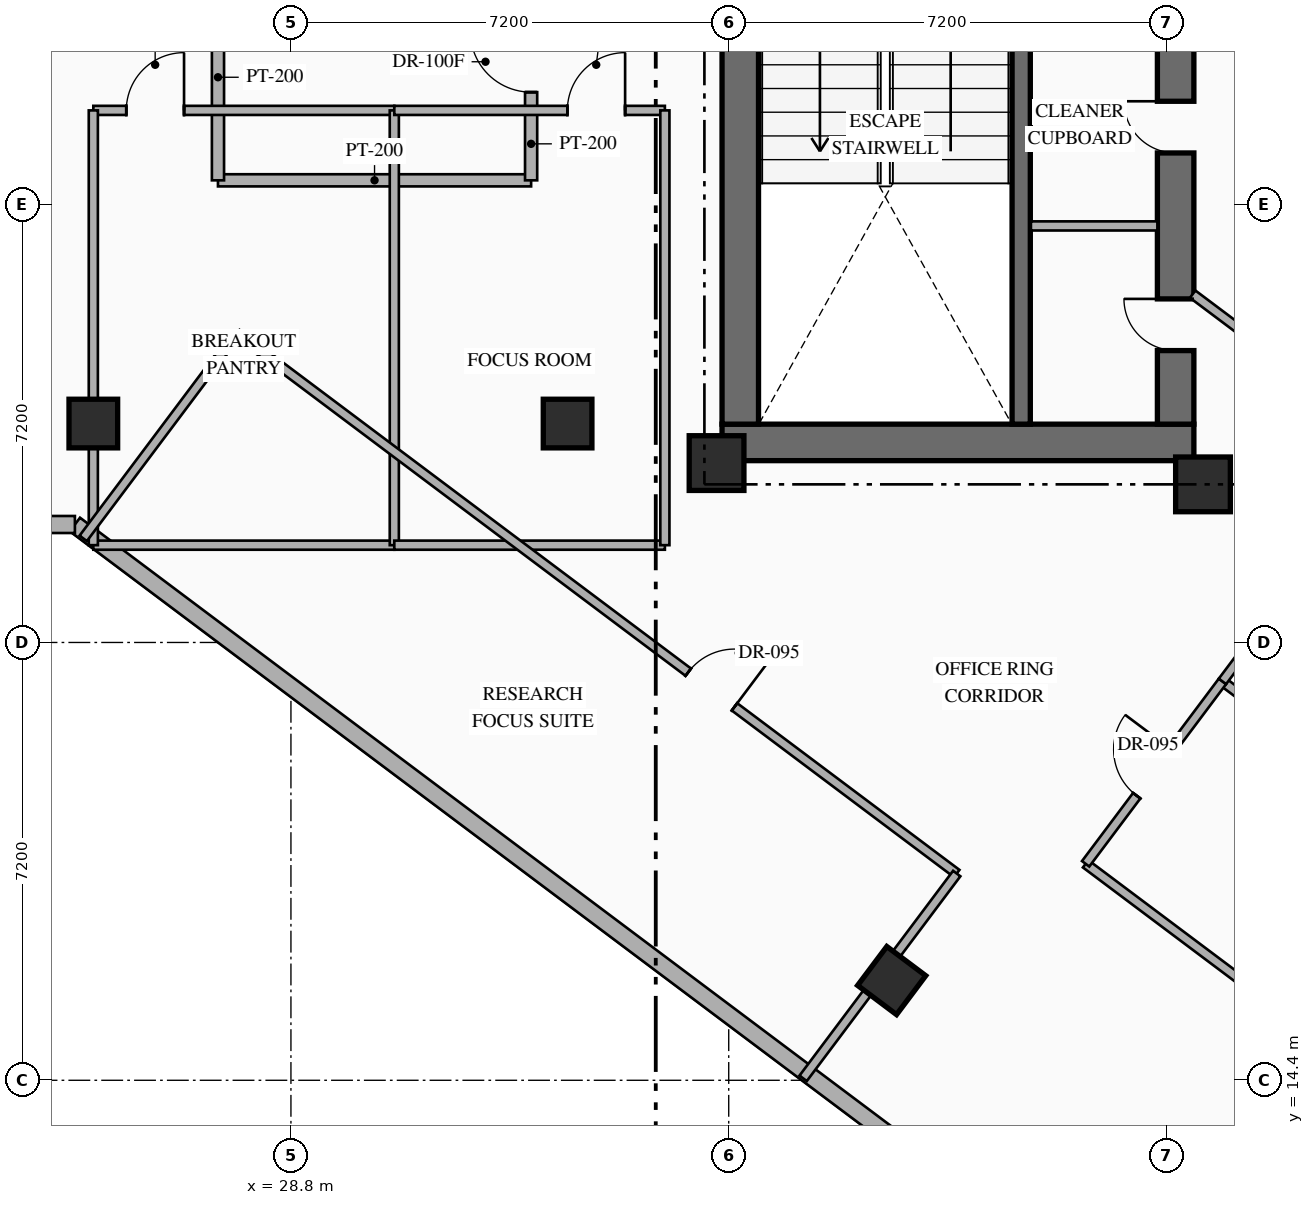
"""IFC4 building model, lengths in metres.
Left out: names, types, materials, properties, quantities, classifications, styles, units other than length and angle.
Written with IfcOpenShell. Run it as: python <this file> out.ifc"""

import sys

from ifc_helpers import new_model, si_unit, direction, frame, frame_2d, origin, origin_2d, place, context, subcontext, project, spatial, rectangle, hollow_rectangle, extrude, element, fill, save


model = new_model("IFC4")
c1 = context("Model", 3, precision=1e-05, world=origin(), true_north=direction((0.0, 1.0)))
c2 = subcontext(c1, "Body", "Model", "MODEL_VIEW")
j1 = project(units=[si_unit("LENGTHUNIT", "METRE"), si_unit("PLANEANGLEUNIT", "RADIAN")], contexts=[c1])
p1 = place(None, origin())
s1 = spatial("IfcSite", under=j1, at=p1, CompositionType="ELEMENT")
p2 = place(p1, origin())
s2 = spatial("IfcBuilding", under=s1, at=p2, CompositionType="ELEMENT")
p3 = place(p2, frame((0.0, 0.0, 167.25)))
s3 = spatial("IfcBuildingStorey", under=s2, at=p3, CompositionType="ELEMENT", Elevation=167.25)
p4 = place(p3, frame((35.89, 24.89, 0.0), z_axis=(0.0, 0.0, 1.0), x_axis=(1.0, 0.0, 0.0)))
e1 = element("IfcWall", 1, at=p4, inside=s3, PredefinedType="SHEAR", context=c2, shape_type="SweptSolid", body=[
    extrude(rectangle(XDim=7.76, YDim=0.6, at=frame_2d((3.88, 0.0))), origin(), (0.0, 0.0, 1.0), 3.6),
])
p5 = place(p3, frame((36.19, 25.19, 0.0), z_axis=(0.0, 0.0, 1.0), x_axis=(0.0, 1.0, 0.0)))
e2 = element("IfcWall", 2, at=p5, inside=s3, PredefinedType="SHEAR", context=c2, shape_type="SweptSolid", body=[
    extrude(rectangle(XDim=9.48, YDim=0.6, at=frame_2d((4.74, 0.0))), origin(), (0.0, 0.0, 1.0), 3.6),
])
p6 = place(p3, frame((43.35, 25.19, 0.0), z_axis=(0.0, 0.0, 1.0), x_axis=(0.0, 1.0, 0.0)))
e3 = element("IfcWall", 3, at=p6, inside=s3, PredefinedType="SHEAR", context=c2, shape_type="SweptSolid", body=[
    extrude(rectangle(XDim=9.48, YDim=0.6, at=frame_2d((4.74, 0.0))), origin(), (0.0, 0.0, 1.0), 3.6),
])
p7 = place(p6, frame((1.21, 0.0, 0.0)))
e4 = element("IfcOpeningElement", 4, at=p7, cuts=e3, PredefinedType="OPENING", context=c2, shape_type="SweptSolid", body=[
    extrude(rectangle(XDim=0.85, YDim=2.08, at=frame_2d((0.425, 1.04))), frame((0.0, 0.31, 0.0), z_axis=(0.0, -1.0, 0.0), x_axis=(1.0, 0.0, 0.0)), (0.0, 0.0, 1.0), 0.62),
])
p8 = place(p6, frame((4.46, 0.0, 0.0)))
e5 = element("IfcOpeningElement", 5, at=p8, cuts=e3, PredefinedType="OPENING", context=c2, shape_type="SweptSolid", body=[
    extrude(rectangle(XDim=0.85, YDim=2.08, at=frame_2d((0.425, 1.04))), frame((0.0, 0.31, 0.0), z_axis=(0.0, -1.0, 0.0), x_axis=(1.0, 0.0, 0.0)), (0.0, 0.0, 1.0), 0.62),
])
p9 = place(p3, frame((40.81, 25.19, 0.0), z_axis=(0.0, 0.0, 1.0), x_axis=(0.0, 1.0, 0.0)))
e6 = element("IfcWall", 6, at=p9, inside=s3, PredefinedType="SHEAR", context=c2, shape_type="SweptSolid", body=[
    extrude(rectangle(XDim=9.48, YDim=0.3, at=frame_2d((4.74, 0.0))), origin(), (0.0, 0.0, 1.0), 3.6),
])
for number, where, z_axis, x_axis in (
    (7, (35.8, 24.55, 0.0), (0.0, 0.0, 1.0), (1.0, 0.0, 0.0)),
    (8, (43.8, 24.2, 0.0), (0.0, 0.0, 1.0), (1.0, 0.0, 0.0)),
):
    element("IfcColumn", number, at=place(p3, frame(where, z_axis=z_axis, x_axis=x_axis)), inside=s3, PredefinedType="COLUMN", context=c2, shape_type="SweptSolid", body=[
        extrude(rectangle(XDim=0.9, YDim=0.9, at=origin_2d()), origin(), (0.0, 0.0, 1.0), 3.6),
    ])
for number, where, z_axis, x_axis in (
    (9, (25.55, 25.2, 0.0), (0.0, 0.0, 1.0), (1.0, 0.0, 0.0)),
    (10, (33.35, 25.2, 0.0), (0.0, 0.0, 1.0), (1.0, 0.0, 0.0)),
    (11, (38.68, 16.04, 0.0), (0.0, 0.0, 1.0), (0.8, -0.6, 0.0)),
):
    element("IfcColumn", number, at=place(p3, frame(where, z_axis=z_axis, x_axis=x_axis)), inside=s3, PredefinedType="COLUMN", context=c2, shape_type="SweptSolid", body=[
        extrude(hollow_rectangle(XDim=0.8, YDim=0.8, WallThickness=0.032, at=origin_2d()), origin(), (0.0, 0.0, 1.0), 3.6),
    ])
p10 = place(p3, frame((44.918, 8.787, 0.0), z_axis=(0.0, 0.0, 1.0), x_axis=(-0.800004765927, 0.599993645378, 0.0)))
e12 = element("IfcWall", 12, at=p10, inside=s3, PredefinedType="STANDARD", context=c2, shape_type="SweptSolid", body=[
    extrude(rectangle(XDim=24.588, YDim=0.28, at=frame_2d((12.294, 0.0))), origin(), (0.0, 0.0, 1.0), 3.35),
])
p11 = place(p3, frame((25.247, 23.54, 0.0), z_axis=(0.0, 0.0, 1.0), x_axis=(-1.0, 0.0, 0.0)))
e13 = element("IfcWall", 13, at=p11, inside=s3, PredefinedType="STANDARD", context=c2, shape_type="SweptSolid", body=[
    extrude(rectangle(XDim=6.747, YDim=0.28, at=frame_2d((3.374, 0.0))), origin(), (0.0, 0.0, 1.0), 3.35),
])
p12 = place(p3, frame((40.97, 28.45, 0.0), z_axis=(0.0, 0.0, 1.0), x_axis=(1.0, 0.0, 0.0)))
e14 = element("IfcWall", 14, at=p12, inside=s3, PredefinedType="PARTITIONING", context=c2, shape_type="SweptSolid", body=[
    extrude(rectangle(XDim=2.08, YDim=0.15, at=frame_2d((1.04, 0.0))), origin(), (0.0, 0.0, 1.0), 3.35),
])
p13 = place(p3, frame((27.6, 29.2, 0.0), z_axis=(0.0, 0.0, 1.0), x_axis=(1.0, 0.0, 0.0)))
e15 = element("IfcWall", 15, at=p13, inside=s3, PredefinedType="STANDARD", context=c2, shape_type="SweptSolid", body=[
    extrude(rectangle(XDim=5.15, YDim=0.2, at=frame_2d((2.575, 0.0))), origin(), (0.0, 0.0, 1.0), 3.35),
])
p14 = place(p3, frame((27.6, 29.2, 0.0), z_axis=(0.0, 0.0, 1.0), x_axis=(0.0, 1.0, 0.0)))
e16 = element("IfcWall", 16, at=p14, inside=s3, PredefinedType="STANDARD", context=c2, shape_type="SweptSolid", body=[
    extrude(rectangle(XDim=3.39, YDim=0.2, at=frame_2d((1.695, 0.0))), origin(), (0.0, 0.0, 1.0), 3.35),
])
p15 = place(p3, frame((32.75, 29.2, 0.0), z_axis=(0.0, 0.0, 1.0), x_axis=(0.0, 1.0, 0.0)))
e17 = element("IfcWall", 17, at=p15, inside=s3, PredefinedType="STANDARD", context=c2, shape_type="SweptSolid", body=[
    extrude(rectangle(XDim=3.39, YDim=0.2, at=frame_2d((1.695, 0.0))), origin(), (0.0, 0.0, 1.0), 3.35),
])
p16 = place(p15, frame((1.45, 0.0, 0.0)))
e18 = element("IfcOpeningElement", 18, at=p16, cuts=e17, PredefinedType="OPENING", context=c2, shape_type="SweptSolid", body=[
    extrude(rectangle(XDim=1.0, YDim=2.2, at=frame_2d((0.5, 1.1))), frame((0.0, 0.11, 0.0), z_axis=(0.0, -1.0, 0.0), x_axis=(1.0, 0.0, 0.0)), (0.0, 0.0, 1.0), 0.22),
])
p17 = place(p3, frame((25.55, 23.2, 0.0), z_axis=(0.0, 0.0, 1.0), x_axis=(1.0, 0.0, 0.0)))
e19 = element("IfcWall", 19, at=p17, inside=s3, PredefinedType="PARTITIONING", context=c2, shape_type="SweptSolid", body=[
    extrude(rectangle(XDim=4.95, YDim=0.15, at=frame_2d((2.475, 0.0))), origin(), (0.0, 0.0, 1.0), 3.35),
])
p18 = place(p3, frame((25.55, 30.35, 0.0), z_axis=(0.0, 0.0, 1.0), x_axis=(1.0, 0.0, 0.0)))
e20 = element("IfcWall", 20, at=p18, inside=s3, PredefinedType="PARTITIONING", context=c2, shape_type="SweptSolid", body=[
    extrude(rectangle(XDim=4.95, YDim=0.15, at=frame_2d((2.475, 0.0))), origin(), (0.0, 0.0, 1.0), 3.35),
])
p19 = place(p18, frame((0.542, 0.0, 0.0)))
e21 = element("IfcOpeningElement", 21, at=p19, cuts=e20, PredefinedType="OPENING", context=c2, shape_type="SweptSolid", body=[
    extrude(rectangle(XDim=0.95, YDim=2.15, at=frame_2d((0.475, 1.075))), frame((0.0, 0.085, 0.0), z_axis=(0.0, -1.0, 0.0), x_axis=(1.0, 0.0, 0.0)), (0.0, 0.0, 1.0), 0.17),
])
p20 = place(p3, frame((25.55, 23.2, 0.0), z_axis=(0.0, 0.0, 1.0), x_axis=(0.0, 1.0, 0.0)))
e22 = element("IfcWall", 22, at=p20, inside=s3, PredefinedType="PARTITIONING", context=c2, shape_type="SweptSolid", body=[
    extrude(rectangle(XDim=7.15, YDim=0.15, at=frame_2d((3.575, 0.0))), origin(), (0.0, 0.0, 1.0), 2.695),
])
p21 = place(p3, frame((30.5, 23.2, 0.0), z_axis=(0.0, 0.0, 1.0), x_axis=(0.0, 1.0, 0.0)))
e23 = element("IfcWall", 23, at=p21, inside=s3, PredefinedType="PARTITIONING", context=c2, shape_type="SweptSolid", body=[
    extrude(rectangle(XDim=7.15, YDim=0.15, at=frame_2d((3.575, 0.0))), origin(), (0.0, 0.0, 1.0), 3.35),
])
p22 = place(p3, frame((30.5, 23.2, 0.0), z_axis=(0.0, 0.0, 1.0), x_axis=(1.0, 0.0, 0.0)))
e24 = element("IfcWall", 24, at=p22, inside=s3, PredefinedType="PARTITIONING", context=c2, shape_type="SweptSolid", body=[
    extrude(rectangle(XDim=4.45, YDim=0.15, at=frame_2d((2.225, 0.0))), origin(), (0.0, 0.0, 1.0), 3.35),
])
p23 = place(p3, frame((30.5, 30.35, 0.0), z_axis=(0.0, 0.0, 1.0), x_axis=(1.0, 0.0, 0.0)))
e25 = element("IfcWall", 25, at=p23, inside=s3, PredefinedType="PARTITIONING", context=c2, shape_type="SweptSolid", body=[
    extrude(rectangle(XDim=4.45, YDim=0.15, at=frame_2d((2.225, 0.0))), origin(), (0.0, 0.0, 1.0), 3.35),
])
p24 = place(p23, frame((2.846, 0.0, 0.0)))
e26 = element("IfcOpeningElement", 26, at=p24, cuts=e25, PredefinedType="OPENING", context=c2, shape_type="SweptSolid", body=[
    extrude(rectangle(XDim=0.95, YDim=2.15, at=frame_2d((0.475, 1.075))), frame((0.0, 0.085, 0.0), z_axis=(0.0, -1.0, 0.0), x_axis=(1.0, 0.0, 0.0)), (0.0, 0.0, 1.0), 0.17),
])
p25 = place(p3, frame((34.95, 23.2, 0.0), z_axis=(0.0, 0.0, 1.0), x_axis=(0.0, 1.0, 0.0)))
e27 = element("IfcWall", 27, at=p25, inside=s3, PredefinedType="PARTITIONING", context=c2, shape_type="SweptSolid", body=[
    extrude(rectangle(XDim=7.15, YDim=0.15, at=frame_2d((3.575, 0.0))), origin(), (0.0, 0.0, 1.0), 3.35),
])
for number, where, z_axis, x_axis in (
    (28, (41.87, 17.96, 0.0), (0.0, 0.0, 1.0), (0.8, -0.6, 0.0)),
    (29, (44.12, 20.96, 0.0), (0.0, 0.0, 1.0), (0.8, -0.6, 0.0)),
):
    element("IfcWall", number, at=place(p3, frame(where, z_axis=z_axis, x_axis=x_axis)), inside=s3, PredefinedType="PARTITIONING", context=c2, shape_type="SweptSolid", body=[
        extrude(rectangle(XDim=10.36, YDim=0.15, at=frame_2d((5.18, 0.0))), origin(), (0.0, 0.0, 1.0), 3.35),
    ])
p26 = place(p3, frame((41.87, 17.96, 0.0), z_axis=(0.0, 0.0, 1.0), x_axis=(0.6, 0.8, 0.0)))
e30 = element("IfcWall", 30, at=p26, inside=s3, PredefinedType="PARTITIONING", context=c2, shape_type="SweptSolid", body=[
    extrude(rectangle(XDim=3.75, YDim=0.15, at=frame_2d((1.875, 0.0))), origin(), (0.0, 0.0, 1.0), 3.35),
])
p27 = place(p26, frame((1.4, 0.0, 0.0)))
e31 = element("IfcOpeningElement", 31, at=p27, cuts=e30, PredefinedType="OPENING", context=c2, shape_type="SweptSolid", body=[
    extrude(rectangle(XDim=0.95, YDim=2.15, at=frame_2d((0.475, 1.075))), frame((0.0, 0.085, 0.0), z_axis=(0.0, -1.0, 0.0), x_axis=(1.0, 0.0, 0.0)), (0.0, 0.0, 1.0), 0.17),
])
p28 = place(p3, frame((44.12, 20.96, 0.0), z_axis=(0.0, 0.0, 1.0), x_axis=(0.59995349547, 0.800034876286, 0.0)))
e32 = element("IfcWall", 32, at=p28, inside=s3, PredefinedType="PARTITIONING", context=c2, shape_type="SweptSolid", body=[
    extrude(rectangle(XDim=4.2, YDim=0.15, at=frame_2d((2.1, 0.0))), origin(), (0.0, 0.0, 1.0), 3.35),
])
p29 = place(p28, frame((1.625, 0.0, 0.0)))
e33 = element("IfcOpeningElement", 33, at=p29, cuts=e32, PredefinedType="OPENING", context=c2, shape_type="SweptSolid", body=[
    extrude(rectangle(XDim=0.95, YDim=2.15, at=frame_2d((0.475, 1.075))), frame((0.0, 0.085, 0.0), z_axis=(0.0, -1.0, 0.0), x_axis=(1.0, 0.0, 0.0)), (0.0, 0.0, 1.0), 0.17),
])
p30 = place(p3, frame((43.63, 27.328, 0.0), z_axis=(0.0, 0.0, 1.0), x_axis=(0.799972182084, -0.600037088764, 0.0)))
e34 = element("IfcWall", 34, at=p30, inside=s3, PredefinedType="PARTITIONING", context=c2, shape_type="SweptSolid", body=[
    extrude(rectangle(XDim=4.213, YDim=0.15, at=frame_2d((2.106, 0.0))), origin(), (0.0, 0.0, 1.0), 3.045),
])
p31 = place(p30, frame((1.256, 0.0, 0.0)))
e35 = element("IfcOpeningElement", 35, at=p31, cuts=e34, PredefinedType="OPENING", context=c2, shape_type="SweptSolid", body=[
    extrude(rectangle(XDim=0.95, YDim=2.15, at=frame_2d((0.475, 1.075))), frame((0.0, 0.085, 0.0), z_axis=(0.0, -1.0, 0.0), x_axis=(1.0, 0.0, 0.0)), (0.0, 0.0, 1.0), 0.17),
])
p32 = place(p3, frame((27.91, 26.68, 0.0), z_axis=(0.0, 0.0, 1.0), x_axis=(0.800005938517, -0.599992081896, 0.0)))
e36 = element("IfcWall", 36, at=p32, inside=s3, PredefinedType="PARTITIONING", context=c2, shape_type="SweptSolid", body=[
    extrude(rectangle(XDim=14.8, YDim=0.15, at=frame_2d((7.4, 0.0))), origin(), (0.0, 0.0, 1.0), 3.35),
])
p33 = place(p32, frame((9.281, 0.0, 0.0)))
e37 = element("IfcOpeningElement", 37, at=p33, cuts=e36, PredefinedType="OPENING", context=c2, shape_type="SweptSolid", body=[
    extrude(rectangle(XDim=0.95, YDim=2.15, at=frame_2d((0.475, 1.075))), frame((0.0, 0.085, 0.0), z_axis=(0.0, -1.0, 0.0), x_axis=(1.0, 0.0, 0.0)), (0.0, 0.0, 1.0), 0.17),
])
p34 = place(p3, frame((25.384, 23.312, 0.0), z_axis=(0.0, 0.0, 1.0), x_axis=(0.599990721155, 0.80000695905, 0.0)))
e38 = element("IfcWall", 38, at=p34, inside=s3, PredefinedType="PARTITIONING", context=c2, shape_type="SweptSolid", body=[
    extrude(rectangle(XDim=4.21, YDim=0.15, at=frame_2d((2.105, 0.0))), origin(), (0.0, 0.0, 1.0), 3.35),
])
p35 = place(p3, frame((37.224, 14.432, 0.0), z_axis=(0.0, 0.0, 1.0), x_axis=(0.599962885857, 0.800027834262, 0.0)))
e39 = element("IfcWall", 39, at=p35, inside=s3, PredefinedType="PARTITIONING", context=c2, shape_type="SweptSolid", body=[
    extrude(rectangle(XDim=4.21, YDim=0.15, at=frame_2d((2.105, 0.0))), origin(), (0.0, 0.0, 1.0), 2.695),
])
p36 = place(p7, origin())
e40 = element("IfcDoor", 40, at=p36, inside=s3, OperationType="SINGLE_SWING_RIGHT", PredefinedType="DOOR", context=c2, shape_type="SweptSolid", body=[
    extrude(rectangle(XDim=0.85, YDim=2.08, at=frame_2d((0.425, 1.04))), frame((0.0, 0.025, 0.0), z_axis=(0.0, -1.0, 0.0), x_axis=(1.0, 0.0, 0.0)), (0.0, 0.0, 1.0), 0.05),
])
fill(e4, e40)
p37 = place(p8, origin())
e41 = element("IfcDoor", 41, at=p37, inside=s3, OperationType="SINGLE_SWING_RIGHT", PredefinedType="DOOR", context=c2, shape_type="SweptSolid", body=[
    extrude(rectangle(XDim=0.85, YDim=2.08, at=frame_2d((0.425, 1.04))), frame((0.0, 0.025, 0.0), z_axis=(0.0, -1.0, 0.0), x_axis=(1.0, 0.0, 0.0)), (0.0, 0.0, 1.0), 0.05),
])
fill(e5, e41)
p38 = place(p16, origin())
e42 = element("IfcDoor", 42, at=p38, inside=s3, OperationType="SINGLE_SWING_RIGHT", PredefinedType="DOOR", context=c2, shape_type="SweptSolid", body=[
    extrude(rectangle(XDim=1.0, YDim=2.2, at=frame_2d((0.5, 1.1))), frame((0.0, 0.025, 0.0), z_axis=(0.0, -1.0, 0.0), x_axis=(1.0, 0.0, 0.0)), (0.0, 0.0, 1.0), 0.05),
])
fill(e18, e42)
p39 = place(p19, origin())
e43 = element("IfcDoor", 43, at=p39, inside=s3, OperationType="SINGLE_SWING_RIGHT", PredefinedType="DOOR", context=c2, shape_type="SweptSolid", body=[
    extrude(rectangle(XDim=0.95, YDim=2.15, at=frame_2d((0.475, 1.075))), frame((0.0, 0.025, 0.0), z_axis=(0.0, -1.0, 0.0), x_axis=(1.0, 0.0, 0.0)), (0.0, 0.0, 1.0), 0.05),
])
fill(e21, e43)
p40 = place(p24, origin())
e44 = element("IfcDoor", 44, at=p40, inside=s3, OperationType="SINGLE_SWING_RIGHT", PredefinedType="DOOR", context=c2, shape_type="SweptSolid", body=[
    extrude(rectangle(XDim=0.95, YDim=2.15, at=frame_2d((0.475, 1.075))), frame((0.0, 0.025, 0.0), z_axis=(0.0, -1.0, 0.0), x_axis=(1.0, 0.0, 0.0)), (0.0, 0.0, 1.0), 0.05),
])
fill(e26, e44)
p41 = place(p27, origin())
e45 = element("IfcDoor", 45, at=p41, inside=s3, OperationType="SINGLE_SWING_RIGHT", PredefinedType="DOOR", context=c2, shape_type="SweptSolid", body=[
    extrude(rectangle(XDim=0.95, YDim=2.15, at=frame_2d((0.475, 1.075))), frame((0.0, 0.025, 0.0), z_axis=(0.0, -1.0, 0.0), x_axis=(1.0, 0.0, 0.0)), (0.0, 0.0, 1.0), 0.05),
])
fill(e31, e45)
p42 = place(p33, origin())
e46 = element("IfcDoor", 46, at=p42, inside=s3, OperationType="SINGLE_SWING_RIGHT", PredefinedType="DOOR", context=c2, shape_type="SweptSolid", body=[
    extrude(rectangle(XDim=0.95, YDim=2.15, at=frame_2d((0.475, 1.075))), frame((0.0, 0.025, 0.0), z_axis=(0.0, -1.0, 0.0), x_axis=(1.0, 0.0, 0.0)), (0.0, 0.0, 1.0), 0.05),
])
fill(e37, e46)
save(model, sys.argv[1])
